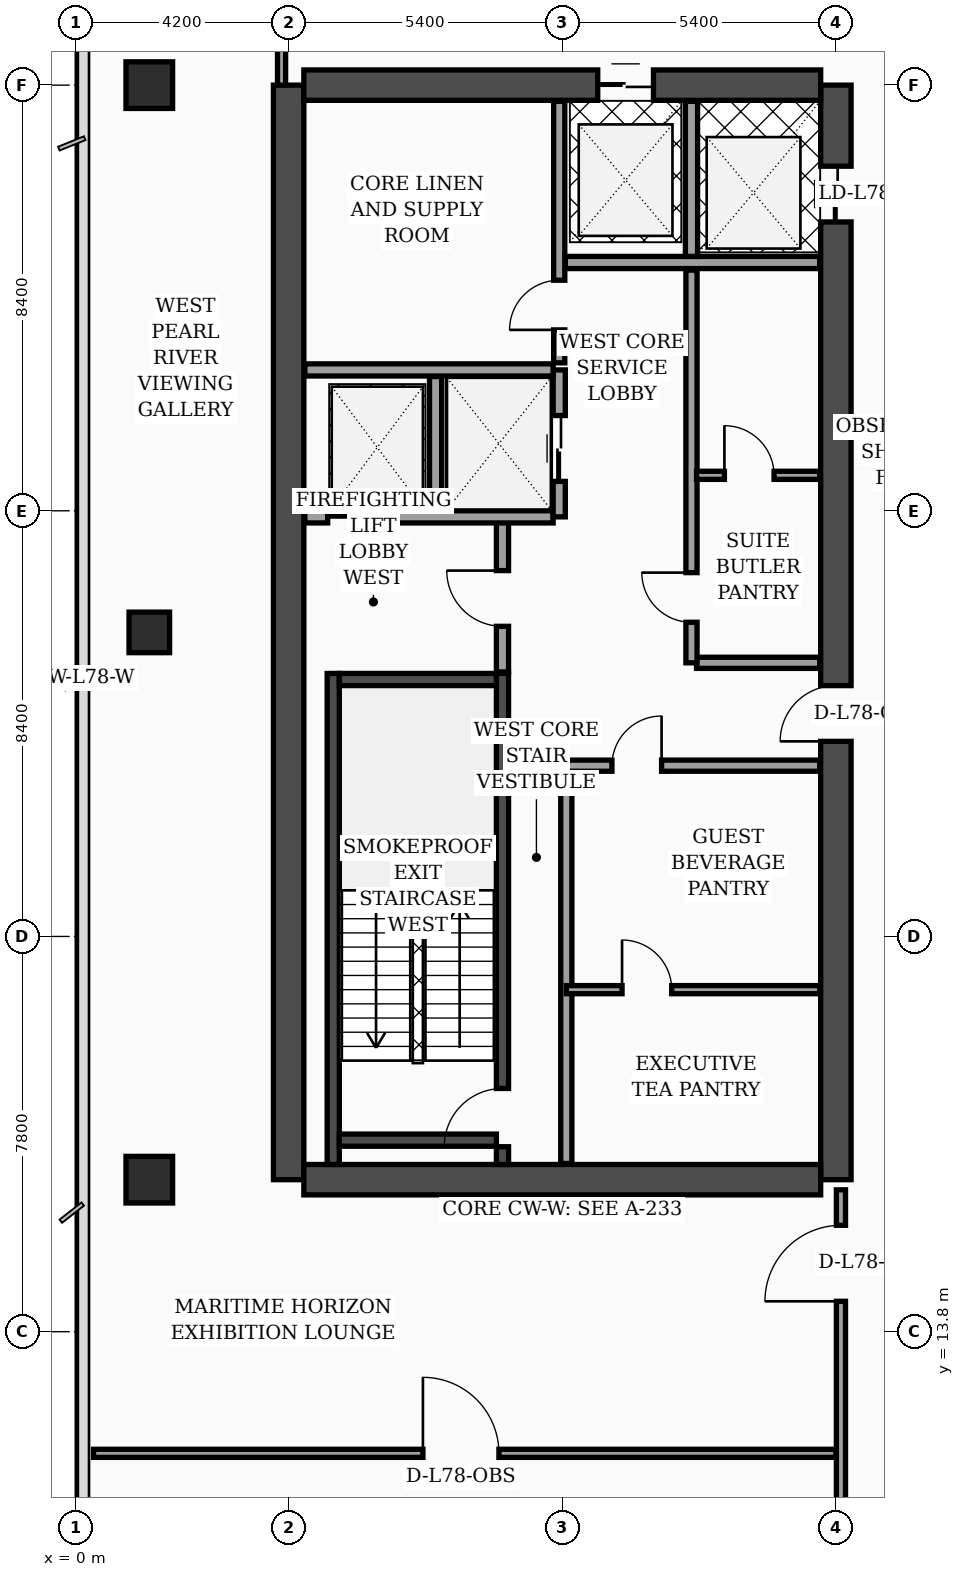
"""IFC4 building model, lengths in metres.
Left out: names, types, materials, properties, quantities, classifications, styles, units other than length and angle.
Written with IfcOpenShell. Run it as: python <this file> out.ifc"""

import sys

from ifc_helpers import new_model, si_unit, direction, frame, frame_2d, origin, origin_2d, place, context, subcontext, project, spatial, rectangle, extrude, element, fill, save


model = new_model("IFC4")
c1 = context("Model", 3, precision=1e-05, world=origin(), true_north=direction((0.0, 1.0)))
c2 = subcontext(c1, "Body", "Model", "MODEL_VIEW")
j1 = project(units=[si_unit("LENGTHUNIT", "METRE"), si_unit("PLANEANGLEUNIT", "RADIAN")], contexts=[c1])
p1 = place(None, origin())
s1 = spatial("IfcSite", under=j1, at=p1, CompositionType="ELEMENT")
p2 = place(p1, origin())
s2 = spatial("IfcBuilding", under=s1, at=p2, CompositionType="ELEMENT")
p3 = place(p2, frame((0.0, 0.0, 316.0)))
s3 = spatial("IfcBuildingStorey", under=s2, at=p3, CompositionType="ELEMENT", Elevation=316.0)
p4 = place(p3, frame((4.2, 16.8, 0.0), z_axis=(0.0, 0.0, 1.0), x_axis=(0.0, 1.0, 0.0)))
e1 = element("IfcWall", 1, at=p4, inside=s3, PredefinedType="SHEAR", context=c2, shape_type="SweptSolid", body=[
    extrude(rectangle(XDim=21.6, YDim=0.6, at=frame_2d((10.8, 0.0))), origin(), (0.0, 0.0, 1.0), 4.26),
])
p5 = place(p3, frame((15.0, 16.8, 0.0), z_axis=(0.0, 0.0, 1.0), x_axis=(0.0, 1.0, 0.0)))
e2 = element("IfcWall", 2, at=p5, inside=s3, PredefinedType="SHEAR", context=c2, shape_type="SweptSolid", body=[
    extrude(rectangle(XDim=21.6, YDim=0.6, at=frame_2d((10.8, 0.0))), origin(), (0.0, 0.0, 1.0), 4.26),
])
p6 = place(p5, frame((8.65, 0.0, 0.0)))
e3 = element("IfcOpeningElement", 3, at=p6, cuts=e2, PredefinedType="OPENING", context=c2, shape_type="SweptSolid", body=[
    extrude(rectangle(XDim=1.1, YDim=2.2, at=frame_2d((0.55, 1.1))), frame((0.0, 0.31, 0.0), z_axis=(0.0, -1.0, 0.0), x_axis=(1.0, 0.0, 0.0)), (0.0, 0.0, 1.0), 0.62),
])
p7 = place(p5, frame((18.9, 0.0, 0.0)))
e4 = element("IfcOpeningElement", 4, at=p7, cuts=e2, PredefinedType="OPENING", context=c2, shape_type="SweptSolid", body=[
    extrude(rectangle(XDim=1.1, YDim=2.2, at=frame_2d((0.55, 1.1))), frame((0.0, 0.31, 0.0), z_axis=(0.0, -1.0, 0.0), x_axis=(1.0, 0.0, 0.0)), (0.0, 0.0, 1.0), 0.62),
])
p8 = place(p3, frame((4.5, 38.4, 0.0), z_axis=(0.0, 0.0, 1.0), x_axis=(1.0, 0.0, 0.0)))
e5 = element("IfcWall", 5, at=p8, inside=s3, PredefinedType="SHEAR", context=c2, shape_type="SweptSolid", body=[
    extrude(rectangle(XDim=10.2, YDim=0.6, at=frame_2d((5.1, 0.0))), origin(), (0.0, 0.0, 1.0), 4.26),
])
p9 = place(p8, frame((5.8, 0.0, 0.0)))
e6 = element("IfcOpeningElement", 6, at=p9, cuts=e5, PredefinedType="OPENING", context=c2, shape_type="SweptSolid", body=[
    extrude(rectangle(XDim=1.1, YDim=2.2, at=frame_2d((0.55, 1.1))), frame((0.0, 0.31, 0.0), z_axis=(0.0, -1.0, 0.0), x_axis=(1.0, 0.0, 0.0)), (0.0, 0.0, 1.0), 0.62),
])
p10 = place(p3, frame((4.5, 16.8, 0.0), z_axis=(0.0, 0.0, 1.0), x_axis=(1.0, 0.0, 0.0)))
e7 = element("IfcWall", 7, at=p10, inside=s3, PredefinedType="SHEAR", context=c2, shape_type="SweptSolid", body=[
    extrude(rectangle(XDim=10.2, YDim=0.6, at=frame_2d((5.1, 0.0))), origin(), (0.0, 0.0, 1.0), 4.26),
])
p11 = place(p3, frame((5.08, 17.1, 0.0), z_axis=(0.0, 0.0, 1.0), x_axis=(0.0, 1.0, 0.0)))
e8 = element("IfcWall", 8, at=p11, inside=s3, PredefinedType="SOLIDWALL", context=c2, shape_type="SweptSolid", body=[
    extrude(rectangle(XDim=9.69, YDim=0.24, at=frame_2d((4.845, 0.0))), origin(), (0.0, 0.0, 1.0), 4.26),
])
p12 = place(p3, frame((8.42, 17.1, 0.0), z_axis=(0.0, 0.0, 1.0), x_axis=(0.0, 1.0, 0.0)))
e9 = element("IfcWall", 9, at=p12, inside=s3, PredefinedType="SOLIDWALL", context=c2, shape_type="SweptSolid", body=[
    extrude(rectangle(XDim=9.69, YDim=0.24, at=frame_2d((4.845, 0.0))), origin(), (0.0, 0.0, 1.0), 4.26),
])
p13 = place(p12, frame((0.35, 0.0, 0.0)))
e10 = element("IfcOpeningElement", 10, at=p13, cuts=e9, PredefinedType="OPENING", context=c2, shape_type="SweptSolid", body=[
    extrude(rectangle(XDim=1.15, YDim=2.2, at=frame_2d((0.575, 1.1))), frame((0.0, 0.13, 0.0), z_axis=(0.0, -1.0, 0.0), x_axis=(1.0, 0.0, 0.0)), (0.0, 0.0, 1.0), 0.26),
])
for number, where, z_axis, x_axis in (
    (11, (5.2, 17.58, 0.0), (0.0, 0.0, 1.0), (1.0, 0.0, 0.0)),
    (12, (5.2, 26.67, 0.0), (0.0, 0.0, 1.0), (1.0, 0.0, 0.0)),
):
    element("IfcWall", number, at=place(p3, frame(where, z_axis=z_axis, x_axis=x_axis)), inside=s3, PredefinedType="SOLIDWALL", context=c2, shape_type="SweptSolid", body=[
        extrude(rectangle(XDim=3.1, YDim=0.24, at=frame_2d((1.55, 0.0))), origin(), (0.0, 0.0, 1.0), 4.26),
    ])
p14 = place(p3, frame((1.45, 16.8, 0.0), z_axis=(0.0, 0.0, 1.0), x_axis=(1.0, 0.0, 0.0)))
e13 = element("IfcColumn", 13, at=p14, inside=s3, PredefinedType="COLUMN", context=c2, shape_type="SweptSolid", body=[
    extrude(rectangle(XDim=0.92, YDim=0.92, at=origin_2d()), origin(), (0.0, 0.0, 1.0), 4.26),
])
p15 = place(p3, frame((1.45, 27.6, 0.0), z_axis=(0.0, 0.0, 1.0), x_axis=(1.0, 0.0, 0.0)))
e14 = element("IfcColumn", 14, at=p15, inside=s3, PredefinedType="COLUMN", context=c2, shape_type="SweptSolid", body=[
    extrude(rectangle(XDim=0.8, YDim=0.8, at=origin_2d()), origin(), (0.0, 0.0, 1.0), 4.26),
])
p16 = place(p3, frame((1.45, 38.4, 0.0), z_axis=(0.0, 0.0, 1.0), x_axis=(1.0, 0.0, 0.0)))
e15 = element("IfcColumn", 15, at=p16, inside=s3, PredefinedType="COLUMN", context=c2, shape_type="SweptSolid", body=[
    extrude(rectangle(XDim=0.92, YDim=0.92, at=origin_2d()), origin(), (0.0, 0.0, 1.0), 4.26),
])
p17 = place(p3, frame((8.42, 26.82, 0.0), z_axis=(0.0, 0.0, 1.0), x_axis=(0.0, 1.0, 0.0)))
e16 = element("IfcWall", 16, at=p17, inside=s3, PredefinedType="SOLIDWALL", context=c2, shape_type="SweptSolid", body=[
    extrude(rectangle(XDim=3.0, YDim=0.24, at=frame_2d((1.5, 0.0))), origin(), (0.0, 0.0, 1.0), 4.26),
])
p18 = place(p17, frame((0.9, 0.0, 0.0)))
e17 = element("IfcOpeningElement", 17, at=p18, cuts=e16, PredefinedType="OPENING", context=c2, shape_type="SweptSolid", body=[
    extrude(rectangle(XDim=1.1, YDim=2.2, at=frame_2d((0.55, 1.1))), frame((0.0, 0.13, 0.0), z_axis=(0.0, -1.0, 0.0), x_axis=(1.0, 0.0, 0.0)), (0.0, 0.0, 1.0), 0.26),
])
p19 = place(p3, frame((4.52, 29.88, 0.0), z_axis=(0.0, 0.0, 1.0), x_axis=(1.0, 0.0, 0.0)))
e18 = element("IfcWall", 18, at=p19, inside=s3, PredefinedType="SOLIDWALL", context=c2, shape_type="SweptSolid", body=[
    extrude(rectangle(XDim=4.9, YDim=0.24, at=frame_2d((2.45, 0.0))), origin(), (0.0, 0.0, 1.0), 4.26),
])
p20 = place(p19, frame((0.45, 0.0, 0.0)))
e19 = element("IfcOpeningElement", 19, at=p20, cuts=e18, PredefinedType="OPENING", context=c2, shape_type="SweptSolid", body=[
    extrude(rectangle(XDim=1.3, YDim=2.35, at=frame_2d((0.65, 1.175))), frame((0.0, 0.13, 0.0), z_axis=(0.0, -1.0, 0.0), x_axis=(1.0, 0.0, 0.0)), (0.0, 0.0, 1.0), 0.26),
])
p21 = place(p3, frame((7.1, 30.02, 0.0), z_axis=(0.0, 0.0, 1.0), x_axis=(0.0, 1.0, 0.0)))
e20 = element("IfcWall", 20, at=p21, inside=s3, PredefinedType="SOLIDWALL", context=c2, shape_type="SweptSolid", body=[
    extrude(rectangle(XDim=2.63, YDim=0.24, at=frame_2d((1.315, 0.0))), origin(), (0.0, 0.0, 1.0), 4.26),
])
p22 = place(p3, frame((9.54, 29.88, 0.0), z_axis=(0.0, 0.0, 1.0), x_axis=(0.0, 1.0, 0.0)))
e21 = element("IfcWall", 21, at=p22, inside=s3, PredefinedType="SOLIDWALL", context=c2, shape_type="SweptSolid", body=[
    extrude(rectangle(XDim=2.9, YDim=0.24, at=frame_2d((1.45, 0.0))), origin(), (0.0, 0.0, 1.0), 4.26),
])
p23 = place(p22, frame((0.7, 0.0, 0.0)))
e22 = element("IfcOpeningElement", 22, at=p23, cuts=e21, PredefinedType="OPENING", context=c2, shape_type="SweptSolid", body=[
    extrude(rectangle(XDim=1.3, YDim=2.35, at=frame_2d((0.65, 1.175))), frame((0.0, 0.13, 0.0), z_axis=(0.0, -1.0, 0.0), x_axis=(1.0, 0.0, 0.0)), (0.0, 0.0, 1.0), 0.26),
])
p24 = place(p3, frame((4.52, 32.78, 0.0), z_axis=(0.0, 0.0, 1.0), x_axis=(1.0, 0.0, 0.0)))
e23 = element("IfcWall", 23, at=p24, inside=s3, PredefinedType="SOLIDWALL", context=c2, shape_type="SweptSolid", body=[
    extrude(rectangle(XDim=4.9, YDim=0.24, at=frame_2d((2.45, 0.0))), origin(), (0.0, 0.0, 1.0), 3.89),
])
p25 = place(p3, frame((9.68, 17.12, 0.0), z_axis=(0.0, 0.0, 1.0), x_axis=(0.0, 1.0, 0.0)))
e24 = element("IfcWall", 24, at=p25, inside=s3, PredefinedType="SOLIDWALL", context=c2, shape_type="SweptSolid", body=[
    extrude(rectangle(XDim=7.88, YDim=0.22, at=frame_2d((3.94, 0.0))), origin(), (0.0, 0.0, 1.0), 4.26),
])
p26 = place(p3, frame((9.54, 32.92, 0.0), z_axis=(0.0, 0.0, 1.0), x_axis=(0.0, 1.0, 0.0)))
e25 = element("IfcWall", 25, at=p26, inside=s3, PredefinedType="SOLIDWALL", context=c2, shape_type="SweptSolid", body=[
    extrude(rectangle(XDim=5.16, YDim=0.22, at=frame_2d((2.58, 0.0))), origin(), (0.0, 0.0, 1.0), 4.26),
])
p27 = place(p26, frame((0.65, 0.0, 0.0)))
e26 = element("IfcOpeningElement", 26, at=p27, cuts=e25, PredefinedType="OPENING", context=c2, shape_type="SweptSolid", body=[
    extrude(rectangle(XDim=0.98, YDim=2.15, at=frame_2d((0.49, 1.075))), frame((0.0, 0.12, 0.0), z_axis=(0.0, -1.0, 0.0), x_axis=(1.0, 0.0, 0.0)), (0.0, 0.0, 1.0), 0.24),
])
p28 = place(p3, frame((9.68, 20.55, 0.0), z_axis=(0.0, 0.0, 1.0), x_axis=(1.0, 0.0, 0.0)))
e27 = element("IfcWall", 27, at=p28, inside=s3, PredefinedType="PARTITIONING", context=c2, shape_type="SweptSolid", body=[
    extrude(rectangle(XDim=5.0, YDim=0.16, at=frame_2d((2.5, 0.0))), origin(), (0.0, 0.0, 1.0), 4.26),
])
p29 = place(p28, frame((1.1, 0.0, 0.0)))
e28 = element("IfcOpeningElement", 28, at=p29, cuts=e27, PredefinedType="OPENING", context=c2, shape_type="SweptSolid", body=[
    extrude(rectangle(XDim=0.98, YDim=2.15, at=frame_2d((0.49, 1.075))), frame((0.0, 0.09, 0.0), z_axis=(0.0, -1.0, 0.0), x_axis=(1.0, 0.0, 0.0)), (0.0, 0.0, 1.0), 0.18),
])
p30 = place(p3, frame((9.68, 24.97, 0.0), z_axis=(0.0, 0.0, 1.0), x_axis=(1.0, 0.0, 0.0)))
e29 = element("IfcWall", 29, at=p30, inside=s3, PredefinedType="SOLIDWALL", context=c2, shape_type="SweptSolid", body=[
    extrude(rectangle(XDim=5.0, YDim=0.22, at=frame_2d((2.5, 0.0))), origin(), (0.0, 0.0, 1.0), 3.69),
])
p31 = place(p30, frame((0.9, 0.0, 0.0)))
e30 = element("IfcOpeningElement", 30, at=p31, cuts=e29, PredefinedType="OPENING", context=c2, shape_type="SweptSolid", body=[
    extrude(rectangle(XDim=0.98, YDim=2.15, at=frame_2d((0.49, 1.075))), frame((0.0, 0.12, 0.0), z_axis=(0.0, -1.0, 0.0), x_axis=(1.0, 0.0, 0.0)), (0.0, 0.0, 1.0), 0.24),
])
p32 = place(p3, frame((12.25, 27.0, 0.0), z_axis=(0.0, 0.0, 1.0), x_axis=(1.0, 0.0, 0.0)))
e31 = element("IfcWall", 31, at=p32, inside=s3, PredefinedType="SOLIDWALL", context=c2, shape_type="SweptSolid", body=[
    extrude(rectangle(XDim=2.43, YDim=0.22, at=frame_2d((1.215, 0.0))), origin(), (0.0, 0.0, 1.0), 4.26),
])
p33 = place(p3, frame((12.15, 27.0, 0.0), z_axis=(0.0, 0.0, 1.0), x_axis=(0.0, 1.0, 0.0)))
e32 = element("IfcWall", 32, at=p33, inside=s3, PredefinedType="SOLIDWALL", context=c2, shape_type="SweptSolid", body=[
    extrude(rectangle(XDim=7.75, YDim=0.22, at=frame_2d((3.875, 0.0))), origin(), (0.0, 0.0, 1.0), 4.26),
])
p34 = place(p33, frame((0.8, 0.0, 0.0)))
e33 = element("IfcOpeningElement", 33, at=p34, cuts=e32, PredefinedType="OPENING", context=c2, shape_type="SweptSolid", body=[
    extrude(rectangle(XDim=0.98, YDim=2.15, at=frame_2d((0.49, 1.075))), frame((0.0, 0.12, 0.0), z_axis=(0.0, -1.0, 0.0), x_axis=(1.0, 0.0, 0.0)), (0.0, 0.0, 1.0), 0.24),
])
p35 = place(p3, frame((12.25, 30.7, 0.0), z_axis=(0.0, 0.0, 1.0), x_axis=(1.0, 0.0, 0.0)))
e34 = element("IfcWall", 34, at=p35, inside=s3, PredefinedType="PARTITIONING", context=c2, shape_type="SweptSolid", body=[
    extrude(rectangle(XDim=2.43, YDim=0.16, at=frame_2d((1.215, 0.0))), origin(), (0.0, 0.0, 1.0), 4.26),
])
p36 = place(p35, frame((0.55, 0.0, 0.0)))
e35 = element("IfcOpeningElement", 35, at=p36, cuts=e34, PredefinedType="OPENING", context=c2, shape_type="SweptSolid", body=[
    extrude(rectangle(XDim=0.98, YDim=2.15, at=frame_2d((0.49, 1.075))), frame((0.0, 0.09, 0.0), z_axis=(0.0, -1.0, 0.0), x_axis=(1.0, 0.0, 0.0)), (0.0, 0.0, 1.0), 0.18),
])
p37 = place(p3, frame((9.66, 34.9, 0.0), z_axis=(0.0, 0.0, 1.0), x_axis=(1.0, 0.0, 0.0)))
e36 = element("IfcWall", 36, at=p37, inside=s3, PredefinedType="SOLIDWALL", context=c2, shape_type="SweptSolid", body=[
    extrude(rectangle(XDim=5.02, YDim=0.24, at=frame_2d((2.51, 0.0))), origin(), (0.0, 0.0, 1.0), 4.26),
])
p38 = place(p3, frame((12.15, 35.02, 0.0), z_axis=(0.0, 0.0, 1.0), x_axis=(0.0, 1.0, 0.0)))
e37 = element("IfcWall", 37, at=p38, inside=s3, PredefinedType="SOLIDWALL", context=c2, shape_type="SweptSolid", body=[
    extrude(rectangle(XDim=3.06, YDim=0.24, at=frame_2d((1.53, 0.0))), origin(), (0.0, 0.0, 1.0), 4.26),
])
p39 = place(p3, frame((4.06, 38.4, 0.0), z_axis=(0.0, 0.0, 1.0), x_axis=(0.0, 1.0, 0.0)))
e38 = element("IfcWall", 38, at=p39, inside=s3, PredefinedType="PARTITIONING", context=c2, shape_type="SweptSolid", body=[
    extrude(rectangle(XDim=5.5, YDim=0.16, at=frame_2d((2.75, 0.0))), origin(), (0.0, 0.0, 1.0), 3.69),
])
p40 = place(p39, frame((3.2, 0.0, 0.0)))
e39 = element("IfcOpeningElement", 39, at=p40, cuts=e38, PredefinedType="OPENING", context=c2, shape_type="SweptSolid", body=[
    extrude(rectangle(XDim=1.02, YDim=2.2, at=frame_2d((0.51, 1.1))), frame((0.0, 0.09, 0.0), z_axis=(0.0, -1.0, 0.0), x_axis=(1.0, 0.0, 0.0)), (0.0, 0.0, 1.0), 0.18),
])
p41 = place(p3, frame((0.35, 11.4, 0.0), z_axis=(0.0, 0.0, 1.0), x_axis=(1.0, 0.0, 0.0)))
e40 = element("IfcWall", 40, at=p41, inside=s3, PredefinedType="PARTITIONING", context=c2, shape_type="SweptSolid", body=[
    extrude(rectangle(XDim=14.65, YDim=0.16, at=frame_2d((7.325, 0.0))), origin(), (0.0, 0.0, 1.0), 3.69),
])
p42 = place(p41, frame((6.5, 0.0, 0.0)))
e41 = element("IfcOpeningElement", 41, at=p42, cuts=e40, PredefinedType="OPENING", context=c2, shape_type="SweptSolid", body=[
    extrude(rectangle(XDim=1.5, YDim=2.22, at=frame_2d((0.75, 1.11))), frame((0.0, 0.09, 0.0), z_axis=(0.0, -1.0, 0.0), x_axis=(1.0, 0.0, 0.0)), (0.0, 0.0, 1.0), 0.18),
])
p43 = place(p3, frame((15.1, 2.6, 0.0), z_axis=(0.0, 0.0, 1.0), x_axis=(0.0, 1.0, 0.0)))
e42 = element("IfcWall", 42, at=p43, inside=s3, PredefinedType="PARTITIONING", context=c2, shape_type="SweptSolid", body=[
    extrude(rectangle(XDim=14.0, YDim=0.18, at=frame_2d((7.0, 0.0))), origin(), (0.0, 0.0, 1.0), 2.54),
])
p44 = place(p43, frame((11.8, 0.0, 0.0)))
e43 = element("IfcOpeningElement", 43, at=p44, cuts=e42, PredefinedType="OPENING", context=c2, shape_type="SweptSolid", body=[
    extrude(rectangle(XDim=1.5, YDim=2.22, at=frame_2d((0.75, 1.11))), frame((0.0, 0.1, 0.0), z_axis=(0.0, -1.0, 0.0), x_axis=(1.0, 0.0, 0.0)), (0.0, 0.0, 1.0), 0.2),
])
p45 = place(p18, origin())
e44 = element("IfcDoor", 44, at=p45, inside=s3, OperationType="SINGLE_SWING_RIGHT", PredefinedType="DOOR", context=c2, shape_type="SweptSolid", body=[
    extrude(rectangle(XDim=1.1, YDim=2.2, at=frame_2d((0.55, 1.1))), frame((0.0, 0.025, 0.0), z_axis=(0.0, -1.0, 0.0), x_axis=(1.0, 0.0, 0.0)), (0.0, 0.0, 1.0), 0.05),
])
fill(e17, e44)
p46 = place(p20, origin())
e45 = element("IfcDoor", 45, at=p46, inside=s3, OperationType="DOUBLE_DOOR_SLIDING", PredefinedType="DOOR", context=c2, shape_type="SweptSolid", body=[
    extrude(rectangle(XDim=1.3, YDim=2.35, at=frame_2d((0.65, 1.175))), frame((0.0, 0.025, 0.0), z_axis=(0.0, -1.0, 0.0), x_axis=(1.0, 0.0, 0.0)), (0.0, 0.0, 1.0), 0.05),
])
fill(e19, e45)
p47 = place(p23, origin())
e46 = element("IfcDoor", 46, at=p47, inside=s3, OperationType="DOUBLE_DOOR_SLIDING", PredefinedType="DOOR", context=c2, shape_type="SweptSolid", body=[
    extrude(rectangle(XDim=1.3, YDim=2.35, at=frame_2d((0.65, 1.175))), frame((0.0, 0.025, 0.0), z_axis=(0.0, -1.0, 0.0), x_axis=(1.0, 0.0, 0.0)), (0.0, 0.0, 1.0), 0.05),
])
fill(e22, e46)
p48 = place(p27, origin())
e47 = element("IfcDoor", 47, at=p48, inside=s3, OperationType="SINGLE_SWING_LEFT", PredefinedType="DOOR", context=c2, shape_type="SweptSolid", body=[
    extrude(rectangle(XDim=0.98, YDim=2.15, at=frame_2d((0.49, 1.075))), frame((0.0, 0.025, 0.0), z_axis=(0.0, -1.0, 0.0), x_axis=(1.0, 0.0, 0.0)), (0.0, 0.0, 1.0), 0.05),
])
fill(e26, e47)
p49 = place(p29, origin())
e48 = element("IfcDoor", 48, at=p49, inside=s3, OperationType="SINGLE_SWING_LEFT", PredefinedType="DOOR", context=c2, shape_type="SweptSolid", body=[
    extrude(rectangle(XDim=0.98, YDim=2.15, at=frame_2d((0.49, 1.075))), frame((0.0, 0.025, 0.0), z_axis=(0.0, -1.0, 0.0), x_axis=(1.0, 0.0, 0.0)), (0.0, 0.0, 1.0), 0.05),
])
fill(e28, e48)
p50 = place(p31, origin())
e49 = element("IfcDoor", 49, at=p50, inside=s3, OperationType="SINGLE_SWING_RIGHT", PredefinedType="DOOR", context=c2, shape_type="SweptSolid", body=[
    extrude(rectangle(XDim=0.98, YDim=2.15, at=frame_2d((0.49, 1.075))), frame((0.0, 0.025, 0.0), z_axis=(0.0, -1.0, 0.0), x_axis=(1.0, 0.0, 0.0)), (0.0, 0.0, 1.0), 0.05),
])
fill(e30, e49)
p51 = place(p34, origin())
e50 = element("IfcDoor", 50, at=p51, inside=s3, OperationType="SINGLE_SWING_RIGHT", PredefinedType="DOOR", context=c2, shape_type="SweptSolid", body=[
    extrude(rectangle(XDim=0.98, YDim=2.15, at=frame_2d((0.49, 1.075))), frame((0.0, 0.025, 0.0), z_axis=(0.0, -1.0, 0.0), x_axis=(1.0, 0.0, 0.0)), (0.0, 0.0, 1.0), 0.05),
])
fill(e33, e50)
p52 = place(p36, origin())
e51 = element("IfcDoor", 51, at=p52, inside=s3, OperationType="SINGLE_SWING_LEFT", PredefinedType="DOOR", context=c2, shape_type="SweptSolid", body=[
    extrude(rectangle(XDim=0.98, YDim=2.15, at=frame_2d((0.49, 1.075))), frame((0.0, 0.025, 0.0), z_axis=(0.0, -1.0, 0.0), x_axis=(1.0, 0.0, 0.0)), (0.0, 0.0, 1.0), 0.05),
])
fill(e35, e51)
p53 = place(p42, origin())
e52 = element("IfcDoor", 52, at=p53, inside=s3, OperationType="SINGLE_SWING_LEFT", PredefinedType="DOOR", context=c2, shape_type="SweptSolid", body=[
    extrude(rectangle(XDim=1.5, YDim=2.22, at=frame_2d((0.75, 1.11))), frame((0.0, 0.025, 0.0), z_axis=(0.0, -1.0, 0.0), x_axis=(1.0, 0.0, 0.0)), (0.0, 0.0, 1.0), 0.05),
])
fill(e41, e52)
p54 = place(p44, origin())
e53 = element("IfcDoor", 53, at=p54, inside=s3, OperationType="SINGLE_SWING_LEFT", PredefinedType="DOOR", context=c2, shape_type="SweptSolid", body=[
    extrude(rectangle(XDim=1.5, YDim=2.22, at=frame_2d((0.75, 1.11))), frame((0.0, 0.025, 0.0), z_axis=(0.0, -1.0, 0.0), x_axis=(1.0, 0.0, 0.0)), (0.0, 0.0, 1.0), 0.05),
])
fill(e43, e53)
p55 = place(p13, origin())
e54 = element("IfcDoor", 54, at=p55, inside=s3, OperationType="SINGLE_SWING_LEFT", PredefinedType="DOOR", context=c2, shape_type="SweptSolid", body=[
    extrude(rectangle(XDim=1.15, YDim=2.2, at=frame_2d((0.575, 1.1))), frame((0.0, 0.025, 0.0), z_axis=(0.0, -1.0, 0.0), x_axis=(1.0, 0.0, 0.0)), (0.0, 0.0, 1.0), 0.05),
])
fill(e10, e54)
p56 = place(p6, origin())
e55 = element("IfcDoor", 55, at=p56, inside=s3, OperationType="SINGLE_SWING_LEFT", PredefinedType="DOOR", context=c2, shape_type="SweptSolid", body=[
    extrude(rectangle(XDim=1.1, YDim=2.2, at=frame_2d((0.55, 1.1))), frame((0.0, 0.025, 0.0), z_axis=(0.0, -1.0, 0.0), x_axis=(1.0, 0.0, 0.0)), (0.0, 0.0, 1.0), 0.05),
])
fill(e3, e55)
p57 = place(p7, origin())
e56 = element("IfcDoor", 56, at=p57, inside=s3, OperationType="DOUBLE_DOOR_SLIDING", PredefinedType="DOOR", context=c2, shape_type="SweptSolid", body=[
    extrude(rectangle(XDim=1.1, YDim=2.2, at=frame_2d((0.55, 1.1))), frame((0.0, 0.025, 0.0), z_axis=(0.0, -1.0, 0.0), x_axis=(1.0, 0.0, 0.0)), (0.0, 0.0, 1.0), 0.05),
])
fill(e4, e56)
p58 = place(p9, origin())
e57 = element("IfcDoor", 57, at=p58, inside=s3, OperationType="DOUBLE_DOOR_SLIDING", PredefinedType="DOOR", context=c2, shape_type="SweptSolid", body=[
    extrude(rectangle(XDim=1.1, YDim=2.2, at=frame_2d((0.55, 1.1))), frame((0.0, 0.025, 0.0), z_axis=(0.0, -1.0, 0.0), x_axis=(1.0, 0.0, 0.0)), (0.0, 0.0, 1.0), 0.05),
])
fill(e6, e57)
save(model, sys.argv[1])
